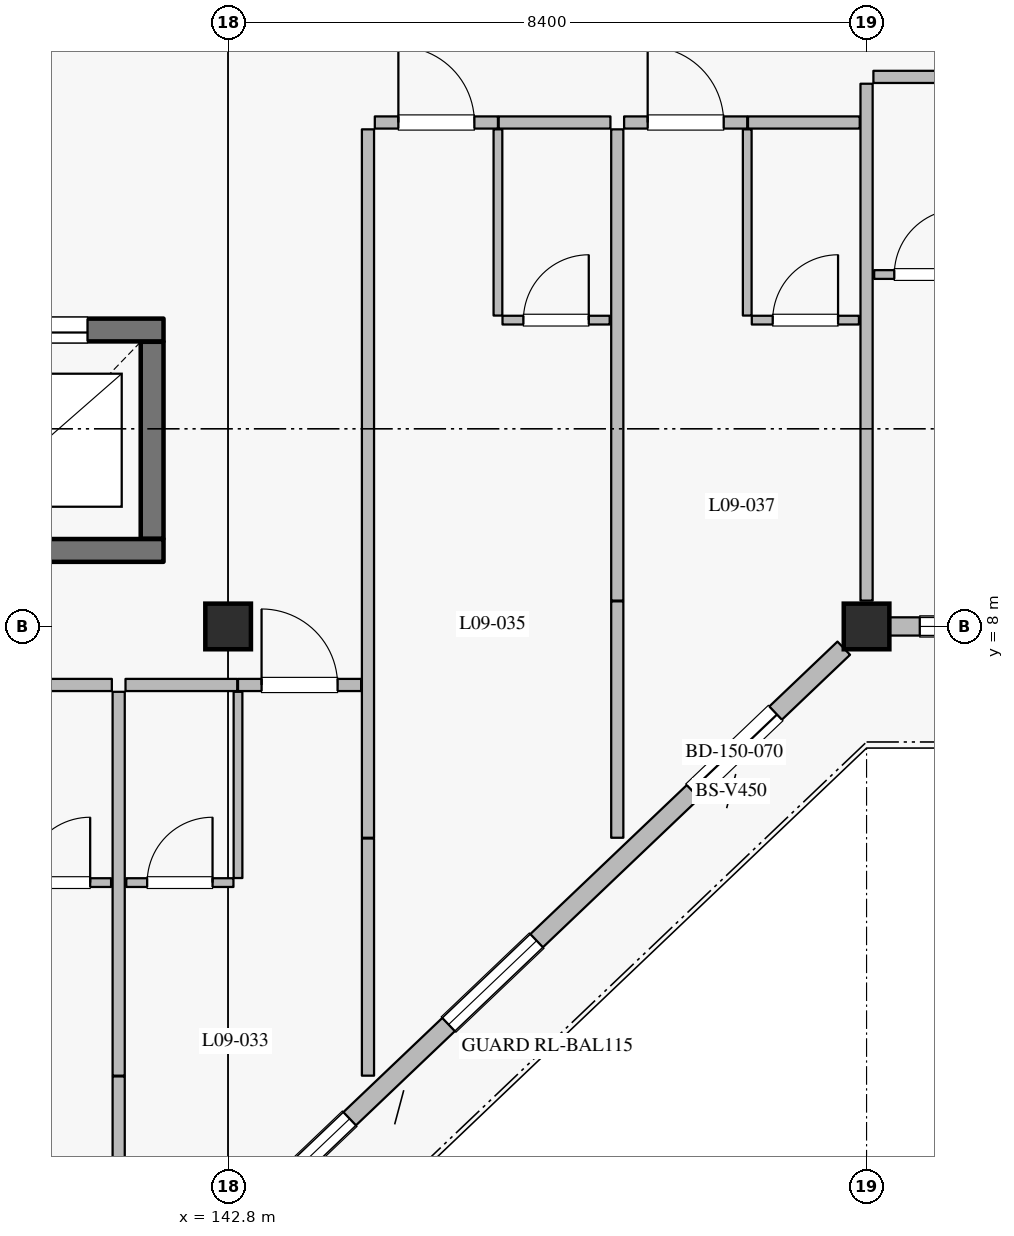
"""IFC4 building model, lengths in metres.
Left out: names, types, materials, properties, quantities, classifications, styles, units other than length and angle.
Written with IfcOpenShell. Run it as: python <this file> out.ifc"""

import sys

from ifc_helpers import new_model, si_unit, direction, frame, frame_2d, origin, origin_2d, place, context, subcontext, project, spatial, rectangle, extrude, element, fill, save


model = new_model("IFC4")
c1 = context("Model", 3, precision=1e-05, world=origin(), true_north=direction((0.0, 1.0)))
c2 = subcontext(c1, "Body", "Model", "MODEL_VIEW")
j1 = project(units=[si_unit("LENGTHUNIT", "METRE"), si_unit("PLANEANGLEUNIT", "RADIAN")], contexts=[c1])
p1 = place(None, origin())
s1 = spatial("IfcSite", under=j1, at=p1, CompositionType="ELEMENT")
p2 = place(p1, origin())
s2 = spatial("IfcBuilding", under=s1, at=p2, CompositionType="ELEMENT")
p3 = place(p2, frame((0.0, 0.0, 39.6)))
s3 = spatial("IfcBuildingStorey", under=s2, at=p3, CompositionType="ELEMENT", Elevation=39.6)
for number, where, z_axis, x_axis in (
    (1, (151.2, 8.0, 0.0), (0.0, 0.0, 1.0), (1.0, 0.0, 0.0)),
    (2, (142.8, 8.0, 0.0), (0.0, 0.0, 1.0), (1.0, 0.0, 0.0)),
):
    element("IfcColumn", number, at=place(p3, frame(where, z_axis=z_axis, x_axis=x_axis)), inside=s3, PredefinedType="COLUMN", context=c2, shape_type="SweptSolid", body=[
        extrude(rectangle(XDim=0.6, YDim=0.6, at=origin_2d()), origin(), (0.0, 0.0, 1.0), 3.6),
    ])
p4 = place(p3, frame((150.9, 7.714, 0.0), z_axis=(0.0, 0.0, 1.0), x_axis=(-0.724145477467, -0.689647248573, 0.0)))
e3 = element("IfcWall", 3, at=p4, inside=s3, PredefinedType="SOLIDWALL", context=c2, shape_type="SweptSolid", body=[
    extrude(rectangle(XDim=10.771, YDim=0.24, at=frame_2d((5.385, 0.0))), origin(), (0.0, 0.0, 1.0), 2.94),
])
p5 = place(p4, frame((1.238, 0.0, 0.0)))
e4 = element("IfcOpeningElement", 4, at=p5, cuts=e3, PredefinedType="OPENING", context=c2, shape_type="SweptSolid", body=[
    extrude(rectangle(XDim=1.5, YDim=2.25, at=frame_2d((0.75, 1.125))), frame((0.0, 0.13, 0.0), z_axis=(0.0, -1.0, 0.0), x_axis=(1.0, 0.0, 0.0)), (0.0, 0.0, 1.0), 0.26),
])
p6 = place(p4, frame((5.58, 0.0, 0.8)))
e5 = element("IfcOpeningElement", 5, at=p6, cuts=e3, PredefinedType="OPENING", context=c2, shape_type="SweptSolid", body=[
    extrude(rectangle(XDim=1.6, YDim=1.6, at=frame_2d((0.8, 0.8))), frame((0.0, 0.13, 0.0), z_axis=(0.0, -1.0, 0.0), x_axis=(1.0, 0.0, 0.0)), (0.0, 0.0, 1.0), 0.26),
])
p7 = place(p4, frame((8.977, 0.0, 0.8)))
e6 = element("IfcOpeningElement", 6, at=p7, cuts=e3, PredefinedType="OPENING", context=c2, shape_type="SweptSolid", body=[
    extrude(rectangle(XDim=1.6, YDim=1.6, at=frame_2d((0.8, 0.8))), frame((0.0, 0.13, 0.0), z_axis=(0.0, -1.0, 0.0), x_axis=(1.0, 0.0, 0.0)), (0.0, 0.0, 1.0), 0.26),
])
p8 = place(p3, frame((159.3, 8.0, 0.0), z_axis=(0.0, 0.0, 1.0), x_axis=(-1.0, 0.0, 0.0)))
e7 = element("IfcWall", 7, at=p8, inside=s3, PredefinedType="SOLIDWALL", context=c2, shape_type="SweptSolid", body=[
    extrude(rectangle(XDim=7.8, YDim=0.24, at=frame_2d((3.9, 0.0))), origin(), (0.0, 0.0, 1.0), 2.94),
])
p9 = place(p8, frame((0.25, 0.0, 0.0)))
e8 = element("IfcOpeningElement", 8, at=p9, cuts=e7, PredefinedType="OPENING", context=c2, shape_type="SweptSolid", body=[
    extrude(rectangle(XDim=1.1, YDim=2.2, at=frame_2d((0.55, 1.1))), frame((0.0, 0.13, 0.0), z_axis=(0.0, -1.0, 0.0), x_axis=(1.0, 0.0, 0.0)), (0.0, 0.0, 1.0), 0.26),
])
p10 = place(p8, frame((2.3, 0.0, 0.8)))
e9 = element("IfcOpeningElement", 9, at=p10, cuts=e7, PredefinedType="OPENING", context=c2, shape_type="SweptSolid", body=[
    extrude(rectangle(XDim=2.0, YDim=1.75, at=frame_2d((1.0, 0.875))), frame((0.0, 0.13, 0.0), z_axis=(0.0, -1.0, 0.0), x_axis=(1.0, 0.0, 0.0)), (0.0, 0.0, 1.0), 0.26),
])
p11 = place(p8, frame((5.4, 0.0, 0.8)))
e10 = element("IfcOpeningElement", 10, at=p11, cuts=e7, PredefinedType="OPENING", context=c2, shape_type="SweptSolid", body=[
    extrude(rectangle(XDim=2.0, YDim=1.75, at=frame_2d((1.0, 0.875))), frame((0.0, 0.13, 0.0), z_axis=(0.0, -1.0, 0.0), x_axis=(1.0, 0.0, 0.0)), (0.0, 0.0, 1.0), 0.26),
])
p12 = place(p3, frame((138.85, 9.0, 0.0), z_axis=(0.0, 0.0, 1.0), x_axis=(1.0, 0.0, 0.0)))
e11 = element("IfcWall", 11, at=p12, inside=s3, PredefinedType="SHEAR", context=c2, shape_type="SweptSolid", body=[
    extrude(rectangle(XDim=3.1, YDim=0.3, at=frame_2d((1.55, 0.0))), origin(), (0.0, 0.0, 1.0), 3.335),
])
p13 = place(p3, frame((141.8, 9.155, 0.0), z_axis=(0.0, 0.0, 1.0), x_axis=(0.0, 1.0, 0.0)))
e12 = element("IfcWall", 12, at=p13, inside=s3, PredefinedType="SHEAR", context=c2, shape_type="SweptSolid", body=[
    extrude(rectangle(XDim=2.59, YDim=0.3, at=frame_2d((1.295, 0.0))), origin(), (0.0, 0.0, 1.0), 3.335),
])
p14 = place(p3, frame((141.95, 11.9, 0.0), z_axis=(0.0, 0.0, 1.0), x_axis=(-1.0, 0.0, 0.0)))
e13 = element("IfcWall", 13, at=p14, inside=s3, PredefinedType="SHEAR", context=c2, shape_type="SweptSolid", body=[
    extrude(rectangle(XDim=3.1, YDim=0.3, at=frame_2d((1.55, 0.0))), origin(), (0.0, 0.0, 1.0), 3.335),
])
p15 = place(p14, frame((1.0, 0.0, 0.0)))
e14 = element("IfcOpeningElement", 14, at=p15, cuts=e13, PredefinedType="OPENING", context=c2, shape_type="SweptSolid", body=[
    extrude(rectangle(XDim=1.1, YDim=2.2, at=frame_2d((0.55, 1.1))), frame((0.0, 0.16, 0.0), z_axis=(0.0, -1.0, 0.0), x_axis=(1.0, 0.0, 0.0)), (0.0, 0.0, 1.0), 0.32),
])
p16 = place(p3, frame((139.8, 7.23, 0.0), z_axis=(0.0, 0.0, 1.0), x_axis=(1.0, 0.0, 0.0)))
e15 = element("IfcWall", 15, at=p16, inside=s3, PredefinedType="PARTITIONING", context=c2, shape_type="SweptSolid", body=[
    extrude(rectangle(XDim=1.47, YDim=0.16, at=frame_2d((0.735, 0.0))), origin(), (0.0, 0.0, 1.0), 3.335),
])
p17 = place(p3, frame((139.85, 4.63, 0.0), z_axis=(0.0, 0.0, 1.0), x_axis=(1.0, 0.0, 0.0)))
e16 = element("IfcWall", 16, at=p17, inside=s3, PredefinedType="PARTITIONING", context=c2, shape_type="SweptSolid", body=[
    extrude(rectangle(XDim=1.41, YDim=0.115, at=frame_2d((0.705, 0.0))), origin(), (0.0, 0.0, 1.0), 3.335),
])
p18 = place(p17, frame((0.275, 0.0, 0.0)))
e17 = element("IfcOpeningElement", 17, at=p18, cuts=e16, PredefinedType="OPENING", context=c2, shape_type="SweptSolid", body=[
    extrude(rectangle(XDim=0.86, YDim=2.12, at=frame_2d((0.43, 1.06))), frame((0.0, 0.067, 0.0), z_axis=(0.0, -1.0, 0.0), x_axis=(1.0, 0.0, 0.0)), (0.0, 0.0, 1.0), 0.135),
])
p19 = place(p3, frame((141.36, 0.34, 0.0), z_axis=(0.0, 0.0, 1.0), x_axis=(0.0, 1.0, 0.0)))
e18 = element("IfcWall", 18, at=p19, inside=s3, PredefinedType="PARTITIONING", context=c2, shape_type="SweptSolid", body=[
    extrude(rectangle(XDim=1.74, YDim=0.16, at=frame_2d((0.87, 0.0))), origin(), (0.0, 0.0, 1.0), 3.335),
])
p20 = place(p3, frame((141.45, 7.23, 0.0), z_axis=(0.0, 0.0, 1.0), x_axis=(1.0, 0.0, 0.0)))
e19 = element("IfcWall", 19, at=p20, inside=s3, PredefinedType="PARTITIONING", context=c2, shape_type="SweptSolid", body=[
    extrude(rectangle(XDim=1.47, YDim=0.16, at=frame_2d((0.735, 0.0))), origin(), (0.0, 0.0, 1.0), 3.335),
])
p21 = place(p3, frame((142.93, 7.23, 0.0), z_axis=(0.0, 0.0, 1.0), x_axis=(1.0, 0.0, 0.0)))
e20 = element("IfcWall", 20, at=p21, inside=s3, PredefinedType="PARTITIONING", context=c2, shape_type="SweptSolid", body=[
    extrude(rectangle(XDim=1.62, YDim=0.16, at=frame_2d((0.81, 0.0))), origin(), (0.0, 0.0, 1.0), 3.335),
])
p22 = place(p21, frame((0.31, 0.0, 0.0)))
e21 = element("IfcOpeningElement", 21, at=p22, cuts=e20, PredefinedType="OPENING", context=c2, shape_type="SweptSolid", body=[
    extrude(rectangle(XDim=1.0, YDim=2.25, at=frame_2d((0.5, 1.125))), frame((0.0, 0.09, 0.0), z_axis=(0.0, -1.0, 0.0), x_axis=(1.0, 0.0, 0.0)), (0.0, 0.0, 1.0), 0.18),
])
p23 = place(p3, frame((142.93, 4.69, 0.0), z_axis=(0.0, 0.0, 1.0), x_axis=(0.0, 1.0, 0.0)))
e22 = element("IfcWall", 22, at=p23, inside=s3, PredefinedType="PARTITIONING", context=c2, shape_type="SweptSolid", body=[
    extrude(rectangle(XDim=2.45, YDim=0.115, at=frame_2d((1.225, 0.0))), origin(), (0.0, 0.0, 1.0), 2.74),
])
p24 = place(p3, frame((141.46, 4.63, 0.0), z_axis=(0.0, 0.0, 1.0), x_axis=(1.0, 0.0, 0.0)))
e23 = element("IfcWall", 23, at=p24, inside=s3, PredefinedType="PARTITIONING", context=c2, shape_type="SweptSolid", body=[
    extrude(rectangle(XDim=1.41, YDim=0.115, at=frame_2d((0.705, 0.0))), origin(), (0.0, 0.0, 1.0), 3.335),
])
p25 = place(p24, frame((0.275, 0.0, 0.0)))
e24 = element("IfcOpeningElement", 24, at=p25, cuts=e23, PredefinedType="OPENING", context=c2, shape_type="SweptSolid", body=[
    extrude(rectangle(XDim=0.86, YDim=2.12, at=frame_2d((0.43, 1.06))), frame((0.0, 0.067, 0.0), z_axis=(0.0, -1.0, 0.0), x_axis=(1.0, 0.0, 0.0)), (0.0, 0.0, 1.0), 0.135),
])
p26 = place(p3, frame((141.36, 2.09, 0.0), z_axis=(0.0, 0.0, 1.0), x_axis=(0.0, 1.0, 0.0)))
e25 = element("IfcWall", 25, at=p26, inside=s3, PredefinedType="PARTITIONING", context=c2, shape_type="SweptSolid", body=[
    extrude(rectangle(XDim=5.05, YDim=0.16, at=frame_2d((2.525, 0.0))), origin(), (0.0, 0.0, 1.0), 3.335),
])
p27 = place(p3, frame((144.64, 2.09, 0.0), z_axis=(0.0, 0.0, 1.0), x_axis=(0.0, 1.0, 0.0)))
e26 = element("IfcWall", 26, at=p27, inside=s3, PredefinedType="PARTITIONING", context=c2, shape_type="SweptSolid", body=[
    extrude(rectangle(XDim=3.12, YDim=0.16, at=frame_2d((1.56, 0.0))), origin(), (0.0, 0.0, 1.0), 3.335),
])
p28 = place(p3, frame((144.73, 14.63, 0.0), z_axis=(0.0, 0.0, 1.0), x_axis=(1.0, 0.0, 0.0)))
e27 = element("IfcWall", 27, at=p28, inside=s3, PredefinedType="PARTITIONING", context=c2, shape_type="SweptSolid", body=[
    extrude(rectangle(XDim=1.62, YDim=0.16, at=frame_2d((0.81, 0.0))), origin(), (0.0, 0.0, 1.0), 3.335),
])
p29 = place(p28, frame((0.31, 0.0, 0.0)))
e28 = element("IfcOpeningElement", 28, at=p29, cuts=e27, PredefinedType="OPENING", context=c2, shape_type="SweptSolid", body=[
    extrude(rectangle(XDim=1.0, YDim=2.25, at=frame_2d((0.5, 1.125))), frame((0.0, 0.09, 0.0), z_axis=(0.0, -1.0, 0.0), x_axis=(1.0, 0.0, 0.0)), (0.0, 0.0, 1.0), 0.18),
])
p30 = place(p3, frame((146.36, 14.63, 0.0), z_axis=(0.0, 0.0, 1.0), x_axis=(1.0, 0.0, 0.0)))
e29 = element("IfcWall", 29, at=p30, inside=s3, PredefinedType="PARTITIONING", context=c2, shape_type="SweptSolid", body=[
    extrude(rectangle(XDim=1.47, YDim=0.16, at=frame_2d((0.735, 0.0))), origin(), (0.0, 0.0, 1.0), 3.335),
])
p31 = place(p3, frame((146.35, 12.09, 0.0), z_axis=(0.0, 0.0, 1.0), x_axis=(0.0, 1.0, 0.0)))
e30 = element("IfcWall", 30, at=p31, inside=s3, PredefinedType="PARTITIONING", context=c2, shape_type="SweptSolid", body=[
    extrude(rectangle(XDim=2.45, YDim=0.115, at=frame_2d((1.225, 0.0))), origin(), (0.0, 0.0, 1.0), 3.335),
])
p32 = place(p3, frame((146.41, 12.03, 0.0), z_axis=(0.0, 0.0, 1.0), x_axis=(1.0, 0.0, 0.0)))
e31 = element("IfcWall", 31, at=p32, inside=s3, PredefinedType="PARTITIONING", context=c2, shape_type="SweptSolid", body=[
    extrude(rectangle(XDim=1.41, YDim=0.115, at=frame_2d((0.705, 0.0))), origin(), (0.0, 0.0, 1.0), 3.335),
])
p33 = place(p32, frame((0.275, 0.0, 0.0)))
e32 = element("IfcOpeningElement", 32, at=p33, cuts=e31, PredefinedType="OPENING", context=c2, shape_type="SweptSolid", body=[
    extrude(rectangle(XDim=0.86, YDim=2.12, at=frame_2d((0.43, 1.06))), frame((0.0, 0.067, 0.0), z_axis=(0.0, -1.0, 0.0), x_axis=(1.0, 0.0, 0.0)), (0.0, 0.0, 1.0), 0.135),
])
p34 = place(p3, frame((144.64, 5.22, 0.0), z_axis=(0.0, 0.0, 1.0), x_axis=(0.0, 1.0, 0.0)))
e33 = element("IfcWall", 33, at=p34, inside=s3, PredefinedType="PARTITIONING", context=c2, shape_type="SweptSolid", body=[
    extrude(rectangle(XDim=9.32, YDim=0.16, at=frame_2d((4.66, 0.0))), origin(), (0.0, 0.0, 1.0), 3.335),
])
p35 = place(p3, frame((147.92, 5.22, 0.0), z_axis=(0.0, 0.0, 1.0), x_axis=(0.0, 1.0, 0.0)))
e34 = element("IfcWall", 34, at=p35, inside=s3, PredefinedType="PARTITIONING", context=c2, shape_type="SweptSolid", body=[
    extrude(rectangle(XDim=3.11, YDim=0.16, at=frame_2d((1.555, 0.0))), origin(), (0.0, 0.0, 1.0), 3.335),
])
p36 = place(p3, frame((148.01, 14.63, 0.0), z_axis=(0.0, 0.0, 1.0), x_axis=(1.0, 0.0, 0.0)))
e35 = element("IfcWall", 35, at=p36, inside=s3, PredefinedType="PARTITIONING", context=c2, shape_type="SweptSolid", body=[
    extrude(rectangle(XDim=1.62, YDim=0.16, at=frame_2d((0.81, 0.0))), origin(), (0.0, 0.0, 1.0), 3.335),
])
p37 = place(p36, frame((0.31, 0.0, 0.0)))
e36 = element("IfcOpeningElement", 36, at=p37, cuts=e35, PredefinedType="OPENING", context=c2, shape_type="SweptSolid", body=[
    extrude(rectangle(XDim=1.0, YDim=2.25, at=frame_2d((0.5, 1.125))), frame((0.0, 0.09, 0.0), z_axis=(0.0, -1.0, 0.0), x_axis=(1.0, 0.0, 0.0)), (0.0, 0.0, 1.0), 0.18),
])
p38 = place(p3, frame((149.64, 14.63, 0.0), z_axis=(0.0, 0.0, 1.0), x_axis=(1.0, 0.0, 0.0)))
e37 = element("IfcWall", 37, at=p38, inside=s3, PredefinedType="PARTITIONING", context=c2, shape_type="SweptSolid", body=[
    extrude(rectangle(XDim=1.47, YDim=0.16, at=frame_2d((0.735, 0.0))), origin(), (0.0, 0.0, 1.0), 3.335),
])
p39 = place(p3, frame((149.63, 12.09, 0.0), z_axis=(0.0, 0.0, 1.0), x_axis=(0.0, 1.0, 0.0)))
e38 = element("IfcWall", 38, at=p39, inside=s3, PredefinedType="PARTITIONING", context=c2, shape_type="SweptSolid", body=[
    extrude(rectangle(XDim=2.45, YDim=0.115, at=frame_2d((1.225, 0.0))), origin(), (0.0, 0.0, 1.0), 3.335),
])
p40 = place(p3, frame((149.69, 12.03, 0.0), z_axis=(0.0, 0.0, 1.0), x_axis=(1.0, 0.0, 0.0)))
e39 = element("IfcWall", 39, at=p40, inside=s3, PredefinedType="PARTITIONING", context=c2, shape_type="SweptSolid", body=[
    extrude(rectangle(XDim=1.41, YDim=0.115, at=frame_2d((0.705, 0.0))), origin(), (0.0, 0.0, 1.0), 3.335),
])
p41 = place(p40, frame((0.275, 0.0, 0.0)))
e40 = element("IfcOpeningElement", 40, at=p41, cuts=e39, PredefinedType="OPENING", context=c2, shape_type="SweptSolid", body=[
    extrude(rectangle(XDim=0.86, YDim=2.12, at=frame_2d((0.43, 1.06))), frame((0.0, 0.067, 0.0), z_axis=(0.0, -1.0, 0.0), x_axis=(1.0, 0.0, 0.0)), (0.0, 0.0, 1.0), 0.135),
])
p42 = place(p3, frame((147.92, 8.34, 0.0), z_axis=(0.0, 0.0, 1.0), x_axis=(0.0, 1.0, 0.0)))
e41 = element("IfcWall", 41, at=p42, inside=s3, PredefinedType="PARTITIONING", context=c2, shape_type="SweptSolid", body=[
    extrude(rectangle(XDim=6.2, YDim=0.16, at=frame_2d((3.1, 0.0))), origin(), (0.0, 0.0, 1.0), 3.335),
])
p43 = place(p3, frame((151.29, 15.23, 0.0), z_axis=(0.0, 0.0, 1.0), x_axis=(1.0, 0.0, 0.0)))
e42 = element("IfcWall", 42, at=p43, inside=s3, PredefinedType="PARTITIONING", context=c2, shape_type="SweptSolid", body=[
    extrude(rectangle(XDim=1.45, YDim=0.16, at=frame_2d((0.725, 0.0))), origin(), (0.0, 0.0, 1.0), 3.335),
])
p44 = place(p3, frame((151.3, 12.63, 0.0), z_axis=(0.0, 0.0, 1.0), x_axis=(1.0, 0.0, 0.0)))
e43 = element("IfcWall", 43, at=p44, inside=s3, PredefinedType="PARTITIONING", context=c2, shape_type="SweptSolid", body=[
    extrude(rectangle(XDim=1.39, YDim=0.115, at=frame_2d((0.695, 0.0))), origin(), (0.0, 0.0, 1.0), 3.335),
])
p45 = place(p44, frame((0.265, 0.0, 0.0)))
e44 = element("IfcOpeningElement", 44, at=p45, cuts=e43, PredefinedType="OPENING", context=c2, shape_type="SweptSolid", body=[
    extrude(rectangle(XDim=0.86, YDim=2.12, at=frame_2d((0.43, 1.06))), frame((0.0, 0.067, 0.0), z_axis=(0.0, -1.0, 0.0), x_axis=(1.0, 0.0, 0.0)), (0.0, 0.0, 1.0), 0.135),
])
p46 = place(p3, frame((151.2, 8.34, 0.0), z_axis=(0.0, 0.0, 1.0), x_axis=(0.0, 1.0, 0.0)))
e45 = element("IfcWall", 45, at=p46, inside=s3, PredefinedType="PARTITIONING", context=c2, shape_type="SweptSolid", body=[
    extrude(rectangle(XDim=6.8, YDim=0.16, at=frame_2d((3.4, 0.0))), origin(), (0.0, 0.0, 1.0), 2.74),
])
p47 = place(p5, origin())
e46 = element("IfcDoor", 46, at=p47, inside=s3, OperationType="SLIDING_TO_LEFT", PredefinedType="DOOR", context=c2, shape_type="SweptSolid", body=[
    extrude(rectangle(XDim=1.5, YDim=2.25, at=frame_2d((0.75, 1.125))), frame((0.0, 0.025, 0.0), z_axis=(0.0, -1.0, 0.0), x_axis=(1.0, 0.0, 0.0)), (0.0, 0.0, 1.0), 0.05),
])
fill(e4, e46)
p48 = place(p6, origin())
e47 = element("IfcWindow", 47, at=p48, inside=s3, PartitioningType="SINGLE_PANEL", PredefinedType="WINDOW", context=c2, shape_type="SweptSolid", body=[
    extrude(rectangle(XDim=1.6, YDim=1.6, at=frame_2d((0.8, 0.8))), frame((0.0, 0.03, 0.0), z_axis=(0.0, -1.0, 0.0), x_axis=(1.0, 0.0, 0.0)), (0.0, 0.0, 1.0), 0.06),
])
fill(e5, e47)
p49 = place(p7, origin())
e48 = element("IfcWindow", 48, at=p49, inside=s3, PartitioningType="SINGLE_PANEL", PredefinedType="WINDOW", context=c2, shape_type="SweptSolid", body=[
    extrude(rectangle(XDim=1.6, YDim=1.6, at=frame_2d((0.8, 0.8))), frame((0.0, 0.03, 0.0), z_axis=(0.0, -1.0, 0.0), x_axis=(1.0, 0.0, 0.0)), (0.0, 0.0, 1.0), 0.06),
])
fill(e6, e48)
p50 = place(p11, origin())
e49 = element("IfcWindow", 49, at=p50, inside=s3, PartitioningType="DOUBLE_PANEL_VERTICAL", PredefinedType="WINDOW", context=c2, shape_type="SweptSolid", body=[
    extrude(rectangle(XDim=2.0, YDim=1.75, at=frame_2d((1.0, 0.875))), frame((0.0, 0.03, 0.0), z_axis=(0.0, -1.0, 0.0), x_axis=(1.0, 0.0, 0.0)), (0.0, 0.0, 1.0), 0.06),
])
fill(e10, e49)
p51 = place(p15, origin())
e50 = element("IfcDoor", 50, at=p51, inside=s3, OperationType="DOUBLE_DOOR_SLIDING", PredefinedType="DOOR", context=c2, shape_type="SweptSolid", body=[
    extrude(rectangle(XDim=1.1, YDim=2.2, at=frame_2d((0.55, 1.1))), frame((0.0, 0.025, 0.0), z_axis=(0.0, -1.0, 0.0), x_axis=(1.0, 0.0, 0.0)), (0.0, 0.0, 1.0), 0.05),
])
fill(e14, e50)
p52 = place(p18, origin())
e51 = element("IfcDoor", 51, at=p52, inside=s3, OperationType="SINGLE_SWING_RIGHT", PredefinedType="DOOR", context=c2, shape_type="SweptSolid", body=[
    extrude(rectangle(XDim=0.86, YDim=2.12, at=frame_2d((0.43, 1.06))), frame((0.0, 0.025, 0.0), z_axis=(0.0, -1.0, 0.0), x_axis=(1.0, 0.0, 0.0)), (0.0, 0.0, 1.0), 0.05),
])
fill(e17, e51)
p53 = place(p22, origin())
e52 = element("IfcDoor", 52, at=p53, inside=s3, OperationType="SINGLE_SWING_LEFT", PredefinedType="DOOR", context=c2, shape_type="SweptSolid", body=[
    extrude(rectangle(XDim=1.0, YDim=2.25, at=frame_2d((0.5, 1.125))), frame((0.0, 0.025, 0.0), z_axis=(0.0, -1.0, 0.0), x_axis=(1.0, 0.0, 0.0)), (0.0, 0.0, 1.0), 0.05),
])
fill(e21, e52)
p54 = place(p25, origin())
e53 = element("IfcDoor", 53, at=p54, inside=s3, OperationType="SINGLE_SWING_RIGHT", PredefinedType="DOOR", context=c2, shape_type="SweptSolid", body=[
    extrude(rectangle(XDim=0.86, YDim=2.12, at=frame_2d((0.43, 1.06))), frame((0.0, 0.025, 0.0), z_axis=(0.0, -1.0, 0.0), x_axis=(1.0, 0.0, 0.0)), (0.0, 0.0, 1.0), 0.05),
])
fill(e24, e53)
p55 = place(p29, origin())
e54 = element("IfcDoor", 54, at=p55, inside=s3, OperationType="SINGLE_SWING_LEFT", PredefinedType="DOOR", context=c2, shape_type="SweptSolid", body=[
    extrude(rectangle(XDim=1.0, YDim=2.25, at=frame_2d((0.5, 1.125))), frame((0.0, 0.025, 0.0), z_axis=(0.0, -1.0, 0.0), x_axis=(1.0, 0.0, 0.0)), (0.0, 0.0, 1.0), 0.05),
])
fill(e28, e54)
p56 = place(p33, origin())
e55 = element("IfcDoor", 55, at=p56, inside=s3, OperationType="SINGLE_SWING_RIGHT", PredefinedType="DOOR", context=c2, shape_type="SweptSolid", body=[
    extrude(rectangle(XDim=0.86, YDim=2.12, at=frame_2d((0.43, 1.06))), frame((0.0, 0.025, 0.0), z_axis=(0.0, -1.0, 0.0), x_axis=(1.0, 0.0, 0.0)), (0.0, 0.0, 1.0), 0.05),
])
fill(e32, e55)
p57 = place(p37, origin())
e56 = element("IfcDoor", 56, at=p57, inside=s3, OperationType="SINGLE_SWING_LEFT", PredefinedType="DOOR", context=c2, shape_type="SweptSolid", body=[
    extrude(rectangle(XDim=1.0, YDim=2.25, at=frame_2d((0.5, 1.125))), frame((0.0, 0.025, 0.0), z_axis=(0.0, -1.0, 0.0), x_axis=(1.0, 0.0, 0.0)), (0.0, 0.0, 1.0), 0.05),
])
fill(e36, e56)
p58 = place(p41, origin())
e57 = element("IfcDoor", 57, at=p58, inside=s3, OperationType="SINGLE_SWING_RIGHT", PredefinedType="DOOR", context=c2, shape_type="SweptSolid", body=[
    extrude(rectangle(XDim=0.86, YDim=2.12, at=frame_2d((0.43, 1.06))), frame((0.0, 0.025, 0.0), z_axis=(0.0, -1.0, 0.0), x_axis=(1.0, 0.0, 0.0)), (0.0, 0.0, 1.0), 0.05),
])
fill(e40, e57)
p59 = place(p45, origin())
e58 = element("IfcDoor", 58, at=p59, inside=s3, OperationType="SINGLE_SWING_RIGHT", PredefinedType="DOOR", context=c2, shape_type="SweptSolid", body=[
    extrude(rectangle(XDim=0.86, YDim=2.12, at=frame_2d((0.43, 1.06))), frame((0.0, 0.025, 0.0), z_axis=(0.0, -1.0, 0.0), x_axis=(1.0, 0.0, 0.0)), (0.0, 0.0, 1.0), 0.05),
])
fill(e44, e58)
save(model, sys.argv[1])
